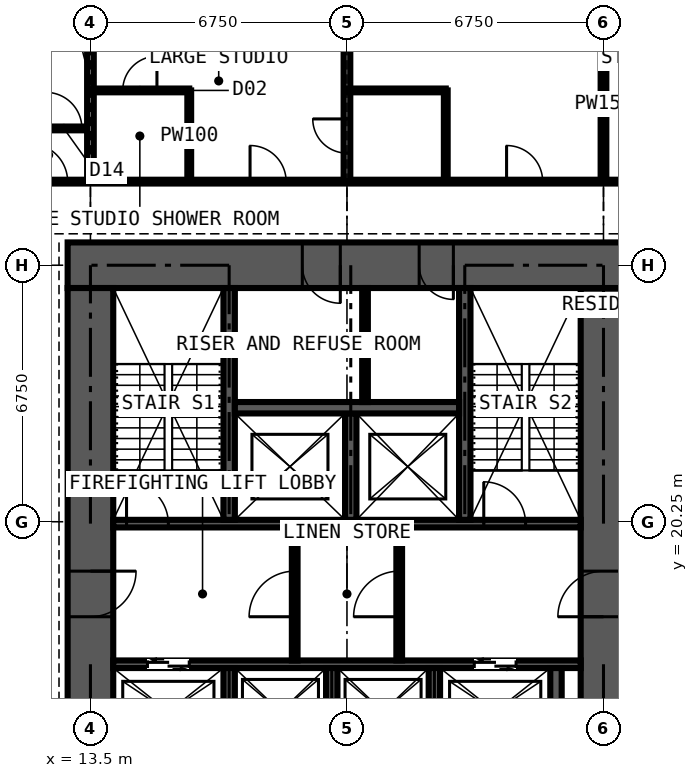
"""IFC4 building model, lengths in metres.
Left out: names, types, materials, properties, quantities, classifications, styles, units other than length and angle.
Written with IfcOpenShell. Run it as: python <this file> out.ifc"""

import sys

from ifc_helpers import new_model, si_unit, direction, frame, frame_2d, origin, place, context, subcontext, project, spatial, rectangle, extrude, element, fill, save


model = new_model("IFC4")
c1 = context("Model", 3, precision=1e-05, world=origin(), true_north=direction((0.0, 1.0)))
c2 = subcontext(c1, "Body", "Model", "MODEL_VIEW")
j1 = project(units=[si_unit("LENGTHUNIT", "METRE"), si_unit("PLANEANGLEUNIT", "RADIAN")], contexts=[c1])
p1 = place(None, origin())
s1 = spatial("IfcSite", under=j1, at=p1, CompositionType="ELEMENT")
p2 = place(p1, origin())
s2 = spatial("IfcBuilding", under=s1, at=p2, CompositionType="ELEMENT")
p3 = place(p2, frame((0.0, 0.0, 123.3)))
s3 = spatial("IfcBuildingStorey", under=s2, at=p3, CompositionType="ELEMENT", Elevation=123.3)
p4 = place(p3, frame((27.0, 14.1, 0.0), z_axis=(0.0, 0.0, 1.0), x_axis=(0.0, 1.0, 0.0)))
e1 = element("IfcWall", 1, at=p4, inside=s3, PredefinedType="SHEAR", context=c2, shape_type="SweptSolid", body=[
    extrude(rectangle(XDim=12.3, YDim=1.2, at=frame_2d((6.15, 0.0))), origin(), (0.0, 0.0, 1.0), 3.6),
])
p5 = place(p4, frame((3.65, 0.0, 0.0)))
e2 = element("IfcOpeningElement", 2, at=p5, cuts=e1, PredefinedType="OPENING", context=c2, shape_type="SweptSolid", body=[
    extrude(rectangle(XDim=1.2, YDim=2.2, at=frame_2d((0.6, 1.1))), frame((0.0, 0.61, 0.0), z_axis=(0.0, -1.0, 0.0), x_axis=(1.0, 0.0, 0.0)), (0.0, 0.0, 1.0), 1.22),
])
p6 = place(p3, frame((27.6, 27.0, 0.0), z_axis=(0.0, 0.0, 1.0), x_axis=(-1.0, 0.0, 0.0)))
e3 = element("IfcWall", 3, at=p6, inside=s3, PredefinedType="SHEAR", context=c2, shape_type="SweptSolid", body=[
    extrude(rectangle(XDim=14.7, YDim=1.2, at=frame_2d((7.35, 0.0))), origin(), (0.0, 0.0, 1.0), 3.6),
])
p7 = place(p6, frame((4.55, 0.0, 0.0)))
e4 = element("IfcOpeningElement", 4, at=p7, cuts=e3, PredefinedType="OPENING", context=c2, shape_type="SweptSolid", body=[
    extrude(rectangle(XDim=0.9, YDim=2.2, at=frame_2d((0.45, 1.1))), frame((0.0, 0.61, 0.0), z_axis=(0.0, -1.0, 0.0), x_axis=(1.0, 0.0, 0.0)), (0.0, 0.0, 1.0), 1.22),
])
p8 = place(p6, frame((7.525, 0.0, 0.0)))
e5 = element("IfcOpeningElement", 5, at=p8, cuts=e3, PredefinedType="OPENING", context=c2, shape_type="SweptSolid", body=[
    extrude(rectangle(XDim=1.0, YDim=2.2, at=frame_2d((0.5, 1.1))), frame((0.0, 0.61, 0.0), z_axis=(0.0, -1.0, 0.0), x_axis=(1.0, 0.0, 0.0)), (0.0, 0.0, 1.0), 1.22),
])
p9 = place(p3, frame((13.5, 26.4, 0.0), z_axis=(0.0, 0.0, 1.0), x_axis=(0.0, -1.0, 0.0)))
e6 = element("IfcWall", 6, at=p9, inside=s3, PredefinedType="SHEAR", context=c2, shape_type="SweptSolid", body=[
    extrude(rectangle(XDim=12.3, YDim=1.2, at=frame_2d((6.15, 0.0))), origin(), (0.0, 0.0, 1.0), 3.6),
])
p10 = place(p9, frame((7.45, 0.0, 0.0)))
e7 = element("IfcOpeningElement", 7, at=p10, cuts=e6, PredefinedType="OPENING", context=c2, shape_type="SweptSolid", body=[
    extrude(rectangle(XDim=1.2, YDim=2.2, at=frame_2d((0.6, 1.1))), frame((0.0, 0.61, 0.0), z_axis=(0.0, -1.0, 0.0), x_axis=(1.0, 0.0, 0.0)), (0.0, 0.0, 1.0), 1.22),
])
p11 = place(p3, frame((14.1, 16.5, 0.0), z_axis=(0.0, 0.0, 1.0), x_axis=(1.0, 0.0, 0.0)))
e8 = element("IfcWall", 8, at=p11, inside=s3, PredefinedType="SHEAR", context=c2, shape_type="SweptSolid", body=[
    extrude(rectangle(XDim=12.3, YDim=0.2, at=frame_2d((6.15, 0.0))), origin(), (0.0, 0.0, 1.0), 3.6),
])
p12 = place(p11, frame((0.9, 0.0, 0.0)))
e9 = element("IfcOpeningElement", 9, at=p12, cuts=e8, PredefinedType="OPENING", context=c2, shape_type="SweptSolid", body=[
    extrude(rectangle(XDim=1.1, YDim=2.2, at=frame_2d((0.55, 1.1))), frame((0.0, 0.11, 0.0), z_axis=(0.0, -1.0, 0.0), x_axis=(1.0, 0.0, 0.0)), (0.0, 0.0, 1.0), 0.22),
])
p13 = place(p11, frame((9.5, 0.0, 0.0)))
e10 = element("IfcOpeningElement", 10, at=p13, cuts=e8, PredefinedType="OPENING", context=c2, shape_type="SweptSolid", body=[
    extrude(rectangle(XDim=1.1, YDim=2.2, at=frame_2d((0.55, 1.1))), frame((0.0, 0.11, 0.0), z_axis=(0.0, -1.0, 0.0), x_axis=(1.0, 0.0, 0.0)), (0.0, 0.0, 1.0), 0.22),
])
p14 = place(p3, frame((14.1, 20.2, 0.0), z_axis=(0.0, 0.0, 1.0), x_axis=(1.0, 0.0, 0.0)))
e11 = element("IfcWall", 11, at=p14, inside=s3, PredefinedType="SHEAR", context=c2, shape_type="SweptSolid", body=[
    extrude(rectangle(XDim=12.3, YDim=0.2, at=frame_2d((6.15, 0.0))), origin(), (0.0, 0.0, 1.0), 3.6),
])
p15 = place(p14, frame((0.35, 0.0, 0.0)))
e12 = element("IfcOpeningElement", 12, at=p15, cuts=e11, PredefinedType="OPENING", context=c2, shape_type="SweptSolid", body=[
    extrude(rectangle(XDim=1.1, YDim=2.2, at=frame_2d((0.55, 1.1))), frame((0.0, 0.11, 0.0), z_axis=(0.0, -1.0, 0.0), x_axis=(1.0, 0.0, 0.0)), (0.0, 0.0, 1.0), 0.22),
])
p16 = place(p14, frame((9.75, 0.0, 0.0)))
e13 = element("IfcOpeningElement", 13, at=p16, cuts=e11, PredefinedType="OPENING", context=c2, shape_type="SweptSolid", body=[
    extrude(rectangle(XDim=1.1, YDim=2.2, at=frame_2d((0.55, 1.1))), frame((0.0, 0.11, 0.0), z_axis=(0.0, -1.0, 0.0), x_axis=(1.0, 0.0, 0.0)), (0.0, 0.0, 1.0), 0.22),
])
for number, where, z_axis, x_axis in (
    (14, (17.15, 20.3, 0.0), (0.0, 0.0, 1.0), (0.0, 1.0, 0.0)),
    (15, (23.35, 20.3, 0.0), (0.0, 0.0, 1.0), (0.0, 1.0, 0.0)),
):
    element("IfcWall", number, at=place(p3, frame(where, z_axis=z_axis, x_axis=x_axis)), inside=s3, PredefinedType="SHEAR", context=c2, shape_type="SweptSolid", body=[
        extrude(rectangle(XDim=6.1, YDim=0.3, at=frame_2d((3.05, 0.0))), origin(), (0.0, 0.0, 1.0), 3.6),
    ])
p17 = place(p3, frame((20.35, 20.3, 0.0), z_axis=(0.0, 0.0, 1.0), x_axis=(0.0, 1.0, 0.0)))
e16 = element("IfcWall", 16, at=p17, inside=s3, PredefinedType="SHEAR", context=c2, shape_type="SweptSolid", body=[
    extrude(rectangle(XDim=2.8, YDim=0.3, at=frame_2d((1.4, 0.0))), origin(), (0.0, 0.0, 1.0), 3.6),
])
p18 = place(p3, frame((17.3, 23.25, 0.0), z_axis=(0.0, 0.0, 1.0), x_axis=(1.0, 0.0, 0.0)))
e17 = element("IfcWall", 17, at=p18, inside=s3, PredefinedType="SHEAR", context=c2, shape_type="SweptSolid", body=[
    extrude(rectangle(XDim=5.9, YDim=0.3, at=frame_2d((2.95, 0.0))), origin(), (0.0, 0.0, 1.0), 3.6),
])
for number, where, z_axis, x_axis in (
    (18, (17.15, 14.1, 0.0), (0.0, 0.0, 1.0), (0.0, 1.0, 0.0)),
    (19, (19.85, 14.1, 0.0), (0.0, 0.0, 1.0), (0.0, 1.0, 0.0)),
    (20, (22.55, 14.1, 0.0), (0.0, 0.0, 1.0), (0.0, 1.0, 0.0)),
    (21, (25.75, 14.1, 0.0), (0.0, 0.0, 1.0), (0.0, 1.0, 0.0)),
):
    element("IfcWall", number, at=place(p3, frame(where, z_axis=z_axis, x_axis=x_axis)), inside=s3, PredefinedType="SHEAR", context=c2, shape_type="SweptSolid", body=[
        extrude(rectangle(XDim=2.3, YDim=0.3, at=frame_2d((1.15, 0.0))), origin(), (0.0, 0.0, 1.0), 3.6),
    ])
p19 = place(p3, frame((18.875, 16.6, 0.0), z_axis=(0.0, 0.0, 1.0), x_axis=(0.0, 1.0, 0.0)))
e22 = element("IfcWall", 22, at=p19, inside=s3, PredefinedType="PARTITIONING", context=c2, shape_type="SweptSolid", body=[
    extrude(rectangle(XDim=3.5, YDim=0.15, at=frame_2d((1.75, 0.0))), origin(), (0.0, 0.0, 1.0), 3.375),
])
p20 = place(p19, frame((1.15, 0.0, 0.0)))
e23 = element("IfcOpeningElement", 23, at=p20, cuts=e22, PredefinedType="OPENING", context=c2, shape_type="SweptSolid", body=[
    extrude(rectangle(XDim=1.2, YDim=2.2, at=frame_2d((0.6, 1.1))), frame((0.0, 0.085, 0.0), z_axis=(0.0, -1.0, 0.0), x_axis=(1.0, 0.0, 0.0)), (0.0, 0.0, 1.0), 0.17),
])
p21 = place(p3, frame((21.625, 16.6, 0.0), z_axis=(0.0, 0.0, 1.0), x_axis=(0.0, 1.0, 0.0)))
e24 = element("IfcWall", 24, at=p21, inside=s3, PredefinedType="PARTITIONING", context=c2, shape_type="SweptSolid", body=[
    extrude(rectangle(XDim=3.5, YDim=0.15, at=frame_2d((1.75, 0.0))), origin(), (0.0, 0.0, 1.0), 3.375),
])
p22 = place(p21, frame((1.15, 0.0, 0.0)))
e25 = element("IfcOpeningElement", 25, at=p22, cuts=e24, PredefinedType="OPENING", context=c2, shape_type="SweptSolid", body=[
    extrude(rectangle(XDim=1.2, YDim=2.2, at=frame_2d((0.6, 1.1))), frame((0.0, 0.085, 0.0), z_axis=(0.0, -1.0, 0.0), x_axis=(1.0, 0.0, 0.0)), (0.0, 0.0, 1.0), 0.17),
])
p23 = place(p3, frame((20.725, 23.4, 0.0), z_axis=(0.0, 0.0, 1.0), x_axis=(0.0, 1.0, 0.0)))
e26 = element("IfcWall", 26, at=p23, inside=s3, PredefinedType="PARTITIONING", context=c2, shape_type="SweptSolid", body=[
    extrude(rectangle(XDim=3.0, YDim=0.15, at=frame_2d((1.5, 0.0))), origin(), (0.0, 0.0, 1.0), 3.375),
])
p24 = place(p3, frame((10.125, 30.6, 0.0), z_axis=(0.0, 0.0, 1.0), x_axis=(1.0, 0.0, 0.0)))
e27 = element("IfcWall", 27, at=p24, inside=s3, PredefinedType="PARTITIONING", context=c2, shape_type="SweptSolid", body=[
    extrude(rectangle(XDim=3.375, YDim=0.1, at=frame_2d((1.688, 0.0))), origin(), (0.0, 0.0, 1.0), 3.375),
])
p25 = place(p24, frame((2.2, 0.0, 0.0)))
e28 = element("IfcOpeningElement", 28, at=p25, cuts=e27, PredefinedType="OPENING", context=c2, shape_type="SweptSolid", body=[
    extrude(rectangle(XDim=0.95, YDim=2.2, at=frame_2d((0.475, 1.1))), frame((0.0, 0.06, 0.0), z_axis=(0.0, -1.0, 0.0), x_axis=(1.0, 0.0, 0.0)), (0.0, 0.0, 1.0), 0.12),
])
p26 = place(p3, frame((11.3, 29.2, 0.0), z_axis=(0.0, 0.0, 1.0), x_axis=(1.0, 0.0, 0.0)))
e29 = element("IfcWall", 29, at=p26, inside=s3, PredefinedType="PARTITIONING", context=c2, shape_type="SweptSolid", body=[
    extrude(rectangle(XDim=19.075, YDim=0.1, at=frame_2d((9.538, 0.0))), origin(), (0.0, 0.0, 1.0), 3.375),
])
p27 = place(p26, frame((6.4, 0.0, 0.0)))
e30 = element("IfcOpeningElement", 30, at=p27, cuts=e29, PredefinedType="OPENING", context=c2, shape_type="SweptSolid", body=[
    extrude(rectangle(XDim=0.95, YDim=2.2, at=frame_2d((0.475, 1.1))), frame((0.0, 0.06, 0.0), z_axis=(0.0, -1.0, 0.0), x_axis=(1.0, 0.0, 0.0)), (0.0, 0.0, 1.0), 0.12),
])
p28 = place(p26, frame((13.15, 0.0, 0.0)))
e31 = element("IfcOpeningElement", 31, at=p28, cuts=e29, PredefinedType="OPENING", context=c2, shape_type="SweptSolid", body=[
    extrude(rectangle(XDim=0.95, YDim=2.2, at=frame_2d((0.475, 1.1))), frame((0.0, 0.06, 0.0), z_axis=(0.0, -1.0, 0.0), x_axis=(1.0, 0.0, 0.0)), (0.0, 0.0, 1.0), 0.12),
])
p29 = place(p26, frame((0.6, 0.0, 0.0)))
e32 = element("IfcOpeningElement", 32, at=p29, cuts=e29, PredefinedType="OPENING", context=c2, shape_type="SweptSolid", body=[
    extrude(rectangle(XDim=1.0, YDim=2.2, at=frame_2d((0.5, 1.1))), frame((0.0, 0.06, 0.0), z_axis=(0.0, -1.0, 0.0), x_axis=(1.0, 0.0, 0.0)), (0.0, 0.0, 1.0), 0.12),
])
p30 = place(p3, frame((13.5, 29.2, 0.0), z_axis=(0.0, 0.0, 1.0), x_axis=(0.0, 1.0, 0.0)))
e33 = element("IfcWall", 33, at=p30, inside=s3, PredefinedType="PARTITIONING", context=c2, shape_type="SweptSolid", body=[
    extrude(rectangle(XDim=5.284, YDim=0.175, at=frame_2d((2.642, 0.0))), origin(), (0.0, 0.0, 1.0), 2.806),
])
p31 = place(p3, frame((13.5, 31.6, 0.0), z_axis=(0.0, 0.0, 1.0), x_axis=(1.0, 0.0, 0.0)))
e34 = element("IfcWall", 34, at=p31, inside=s3, PredefinedType="PARTITIONING", context=c2, shape_type="SweptSolid", body=[
    extrude(rectangle(XDim=2.6, YDim=0.1, at=frame_2d((1.3, 0.0))), origin(), (0.0, 0.0, 1.0), 3.375),
])
p32 = place(p31, frame((0.85, 0.0, 0.0)))
e35 = element("IfcOpeningElement", 35, at=p32, cuts=e34, PredefinedType="OPENING", context=c2, shape_type="SweptSolid", body=[
    extrude(rectangle(XDim=0.9, YDim=2.2, at=frame_2d((0.45, 1.1))), frame((0.0, 0.06, 0.0), z_axis=(0.0, -1.0, 0.0), x_axis=(1.0, 0.0, 0.0)), (0.0, 0.0, 1.0), 0.12),
])
p33 = place(p3, frame((16.1, 29.2, 0.0), z_axis=(0.0, 0.0, 1.0), x_axis=(0.0, 1.0, 0.0)))
e36 = element("IfcWall", 36, at=p33, inside=s3, PredefinedType="PARTITIONING", context=c2, shape_type="SweptSolid", body=[
    extrude(rectangle(XDim=2.4, YDim=0.1, at=frame_2d((1.2, 0.0))), origin(), (0.0, 0.0, 1.0), 3.375),
])
p34 = place(p3, frame((20.25, 29.2, 0.0), z_axis=(0.0, 0.0, 1.0), x_axis=(0.0, 1.0, 0.0)))
e37 = element("IfcWall", 37, at=p34, inside=s3, PredefinedType="PARTITIONING", context=c2, shape_type="SweptSolid", body=[
    extrude(rectangle(XDim=5.284, YDim=0.175, at=frame_2d((2.642, 0.0))), origin(), (0.0, 0.0, 1.0), 2.61),
])
p35 = place(p34, frame((0.75, 0.0, 0.0)))
e38 = element("IfcOpeningElement", 38, at=p35, cuts=e37, PredefinedType="OPENING", context=c2, shape_type="SweptSolid", body=[
    extrude(rectangle(XDim=0.9, YDim=2.2, at=frame_2d((0.45, 1.1))), frame((0.0, 0.097, 0.0), z_axis=(0.0, -1.0, 0.0), x_axis=(1.0, 0.0, 0.0)), (0.0, 0.0, 1.0), 0.195),
])
p36 = place(p3, frame((20.25, 31.6, 0.0), z_axis=(0.0, 0.0, 1.0), x_axis=(1.0, 0.0, 0.0)))
e39 = element("IfcWall", 39, at=p36, inside=s3, PredefinedType="PARTITIONING", context=c2, shape_type="SweptSolid", body=[
    extrude(rectangle(XDim=2.6, YDim=0.1, at=frame_2d((1.3, 0.0))), origin(), (0.0, 0.0, 1.0), 3.375),
])
p37 = place(p3, frame((22.85, 29.2, 0.0), z_axis=(0.0, 0.0, 1.0), x_axis=(0.0, 1.0, 0.0)))
e40 = element("IfcWall", 40, at=p37, inside=s3, PredefinedType="PARTITIONING", context=c2, shape_type="SweptSolid", body=[
    extrude(rectangle(XDim=2.4, YDim=0.1, at=frame_2d((1.2, 0.0))), origin(), (0.0, 0.0, 1.0), 3.375),
])
p38 = place(p3, frame((27.0, 29.2, 0.0), z_axis=(0.0, 0.0, 1.0), x_axis=(0.0, 1.0, 0.0)))
e41 = element("IfcWall", 41, at=p38, inside=s3, PredefinedType="PARTITIONING", context=c2, shape_type="SweptSolid", body=[
    extrude(rectangle(XDim=5.284, YDim=0.15, at=frame_2d((2.642, 0.0))), origin(), (0.0, 0.0, 1.0), 2.61),
])
p39 = place(p12, origin())
e42 = element("IfcDoor", 42, at=p39, inside=s3, OperationType="DOUBLE_DOOR_SLIDING", PredefinedType="DOOR", context=c2, shape_type="SweptSolid", body=[
    extrude(rectangle(XDim=1.1, YDim=2.2, at=frame_2d((0.55, 1.1))), frame((0.0, 0.025, 0.0), z_axis=(0.0, -1.0, 0.0), x_axis=(1.0, 0.0, 0.0)), (0.0, 0.0, 1.0), 0.05),
])
fill(e9, e42)
p40 = place(p13, origin())
e43 = element("IfcDoor", 43, at=p40, inside=s3, OperationType="DOUBLE_DOOR_SLIDING", PredefinedType="DOOR", context=c2, shape_type="SweptSolid", body=[
    extrude(rectangle(XDim=1.1, YDim=2.2, at=frame_2d((0.55, 1.1))), frame((0.0, 0.025, 0.0), z_axis=(0.0, -1.0, 0.0), x_axis=(1.0, 0.0, 0.0)), (0.0, 0.0, 1.0), 0.05),
])
fill(e10, e43)
p41 = place(p10, origin())
e44 = element("IfcDoor", 44, at=p41, inside=s3, OperationType="DOUBLE_DOOR_SINGLE_SWING", PredefinedType="DOOR", context=c2, shape_type="SweptSolid", body=[
    extrude(rectangle(XDim=1.2, YDim=2.2, at=frame_2d((0.6, 1.1))), frame((0.0, 0.025, 0.0), z_axis=(0.0, -1.0, 0.0), x_axis=(1.0, 0.0, 0.0)), (0.0, 0.0, 1.0), 0.05),
])
fill(e7, e44)
p42 = place(p5, origin())
e45 = element("IfcDoor", 45, at=p42, inside=s3, OperationType="DOUBLE_DOOR_SINGLE_SWING", PredefinedType="DOOR", context=c2, shape_type="SweptSolid", body=[
    extrude(rectangle(XDim=1.2, YDim=2.2, at=frame_2d((0.6, 1.1))), frame((0.0, 0.025, 0.0), z_axis=(0.0, -1.0, 0.0), x_axis=(1.0, 0.0, 0.0)), (0.0, 0.0, 1.0), 0.05),
])
fill(e2, e45)
p43 = place(p20, origin())
e46 = element("IfcDoor", 46, at=p43, inside=s3, OperationType="DOUBLE_DOOR_SINGLE_SWING", PredefinedType="DOOR", context=c2, shape_type="SweptSolid", body=[
    extrude(rectangle(XDim=1.2, YDim=2.2, at=frame_2d((0.6, 1.1))), frame((0.0, 0.025, 0.0), z_axis=(0.0, -1.0, 0.0), x_axis=(1.0, 0.0, 0.0)), (0.0, 0.0, 1.0), 0.05),
])
fill(e23, e46)
p44 = place(p22, origin())
e47 = element("IfcDoor", 47, at=p44, inside=s3, OperationType="DOUBLE_DOOR_SINGLE_SWING", PredefinedType="DOOR", context=c2, shape_type="SweptSolid", body=[
    extrude(rectangle(XDim=1.2, YDim=2.2, at=frame_2d((0.6, 1.1))), frame((0.0, 0.025, 0.0), z_axis=(0.0, -1.0, 0.0), x_axis=(1.0, 0.0, 0.0)), (0.0, 0.0, 1.0), 0.05),
])
fill(e25, e47)
p45 = place(p7, origin())
e48 = element("IfcDoor", 48, at=p45, inside=s3, OperationType="SINGLE_SWING_LEFT", PredefinedType="DOOR", context=c2, shape_type="SweptSolid", body=[
    extrude(rectangle(XDim=0.9, YDim=2.2, at=frame_2d((0.45, 1.1))), frame((0.0, 0.4, 0.0), z_axis=(0.0, -1.0, 0.0), x_axis=(1.0, 0.0, 0.0)), (0.0, 0.0, 1.0), 0.8),
])
fill(e4, e48)
p46 = place(p8, origin())
e49 = element("IfcDoor", 49, at=p46, inside=s3, OperationType="SINGLE_SWING_LEFT", PredefinedType="DOOR", context=c2, shape_type="SweptSolid", body=[
    extrude(rectangle(XDim=1.0, YDim=2.2, at=frame_2d((0.5, 1.1))), frame((0.0, 0.025, 0.0), z_axis=(0.0, -1.0, 0.0), x_axis=(1.0, 0.0, 0.0)), (0.0, 0.0, 1.0), 0.05),
])
fill(e5, e49)
p47 = place(p15, origin())
e50 = element("IfcDoor", 50, at=p47, inside=s3, OperationType="SINGLE_SWING_LEFT", PredefinedType="DOOR", context=c2, shape_type="SweptSolid", body=[
    extrude(rectangle(XDim=1.1, YDim=2.2, at=frame_2d((0.55, 1.1))), frame((0.0, 0.025, 0.0), z_axis=(0.0, -1.0, 0.0), x_axis=(1.0, 0.0, 0.0)), (0.0, 0.0, 1.0), 0.05),
])
fill(e12, e50)
p48 = place(p16, origin())
e51 = element("IfcDoor", 51, at=p48, inside=s3, OperationType="SINGLE_SWING_LEFT", PredefinedType="DOOR", context=c2, shape_type="SweptSolid", body=[
    extrude(rectangle(XDim=1.1, YDim=2.2, at=frame_2d((0.55, 1.1))), frame((0.0, 0.025, 0.0), z_axis=(0.0, -1.0, 0.0), x_axis=(1.0, 0.0, 0.0)), (0.0, 0.0, 1.0), 0.05),
])
fill(e13, e51)
p49 = place(p27, origin())
e52 = element("IfcDoor", 52, at=p49, inside=s3, OperationType="SINGLE_SWING_LEFT", PredefinedType="DOOR", context=c2, shape_type="SweptSolid", body=[
    extrude(rectangle(XDim=0.95, YDim=2.2, at=frame_2d((0.475, 1.1))), frame((0.0, 0.025, 0.0), z_axis=(0.0, -1.0, 0.0), x_axis=(1.0, 0.0, 0.0)), (0.0, 0.0, 1.0), 0.05),
])
fill(e30, e52)
p50 = place(p32, origin())
e53 = element("IfcDoor", 53, at=p50, inside=s3, OperationType="SINGLE_SWING_RIGHT", PredefinedType="DOOR", context=c2, shape_type="SweptSolid", body=[
    extrude(rectangle(XDim=0.9, YDim=2.2, at=frame_2d((0.45, 1.1))), frame((0.0, 0.025, 0.0), z_axis=(0.0, -1.0, 0.0), x_axis=(1.0, 0.0, 0.0)), (0.0, 0.0, 1.0), 0.05),
])
fill(e35, e53)
p51 = place(p28, origin())
e54 = element("IfcDoor", 54, at=p51, inside=s3, OperationType="SINGLE_SWING_LEFT", PredefinedType="DOOR", context=c2, shape_type="SweptSolid", body=[
    extrude(rectangle(XDim=0.95, YDim=2.2, at=frame_2d((0.475, 1.1))), frame((0.0, 0.025, 0.0), z_axis=(0.0, -1.0, 0.0), x_axis=(1.0, 0.0, 0.0)), (0.0, 0.0, 1.0), 0.05),
])
fill(e31, e54)
p52 = place(p35, origin())
e55 = element("IfcDoor", 55, at=p52, inside=s3, OperationType="SINGLE_SWING_RIGHT", PredefinedType="DOOR", context=c2, shape_type="SweptSolid", body=[
    extrude(rectangle(XDim=0.9, YDim=2.2, at=frame_2d((0.45, 1.1))), frame((0.0, 0.025, 0.0), z_axis=(0.0, -1.0, 0.0), x_axis=(1.0, 0.0, 0.0)), (0.0, 0.0, 1.0), 0.05),
])
fill(e38, e55)
p53 = place(p25, origin())
e56 = element("IfcDoor", 56, at=p53, inside=s3, OperationType="SINGLE_SWING_LEFT", PredefinedType="DOOR", context=c2, shape_type="SweptSolid", body=[
    extrude(rectangle(XDim=0.95, YDim=2.2, at=frame_2d((0.475, 1.1))), frame((0.0, 0.025, 0.0), z_axis=(0.0, -1.0, 0.0), x_axis=(1.0, 0.0, 0.0)), (0.0, 0.0, 1.0), 0.05),
])
fill(e28, e56)
p54 = place(p29, origin())
e57 = element("IfcDoor", 57, at=p54, inside=s3, OperationType="SINGLE_SWING_LEFT", PredefinedType="DOOR", context=c2, shape_type="SweptSolid", body=[
    extrude(rectangle(XDim=1.0, YDim=2.2, at=frame_2d((0.5, 1.1))), frame((0.0, 0.025, 0.0), z_axis=(0.0, -1.0, 0.0), x_axis=(1.0, 0.0, 0.0)), (0.0, 0.0, 1.0), 0.05),
])
fill(e32, e57)
save(model, sys.argv[1])
